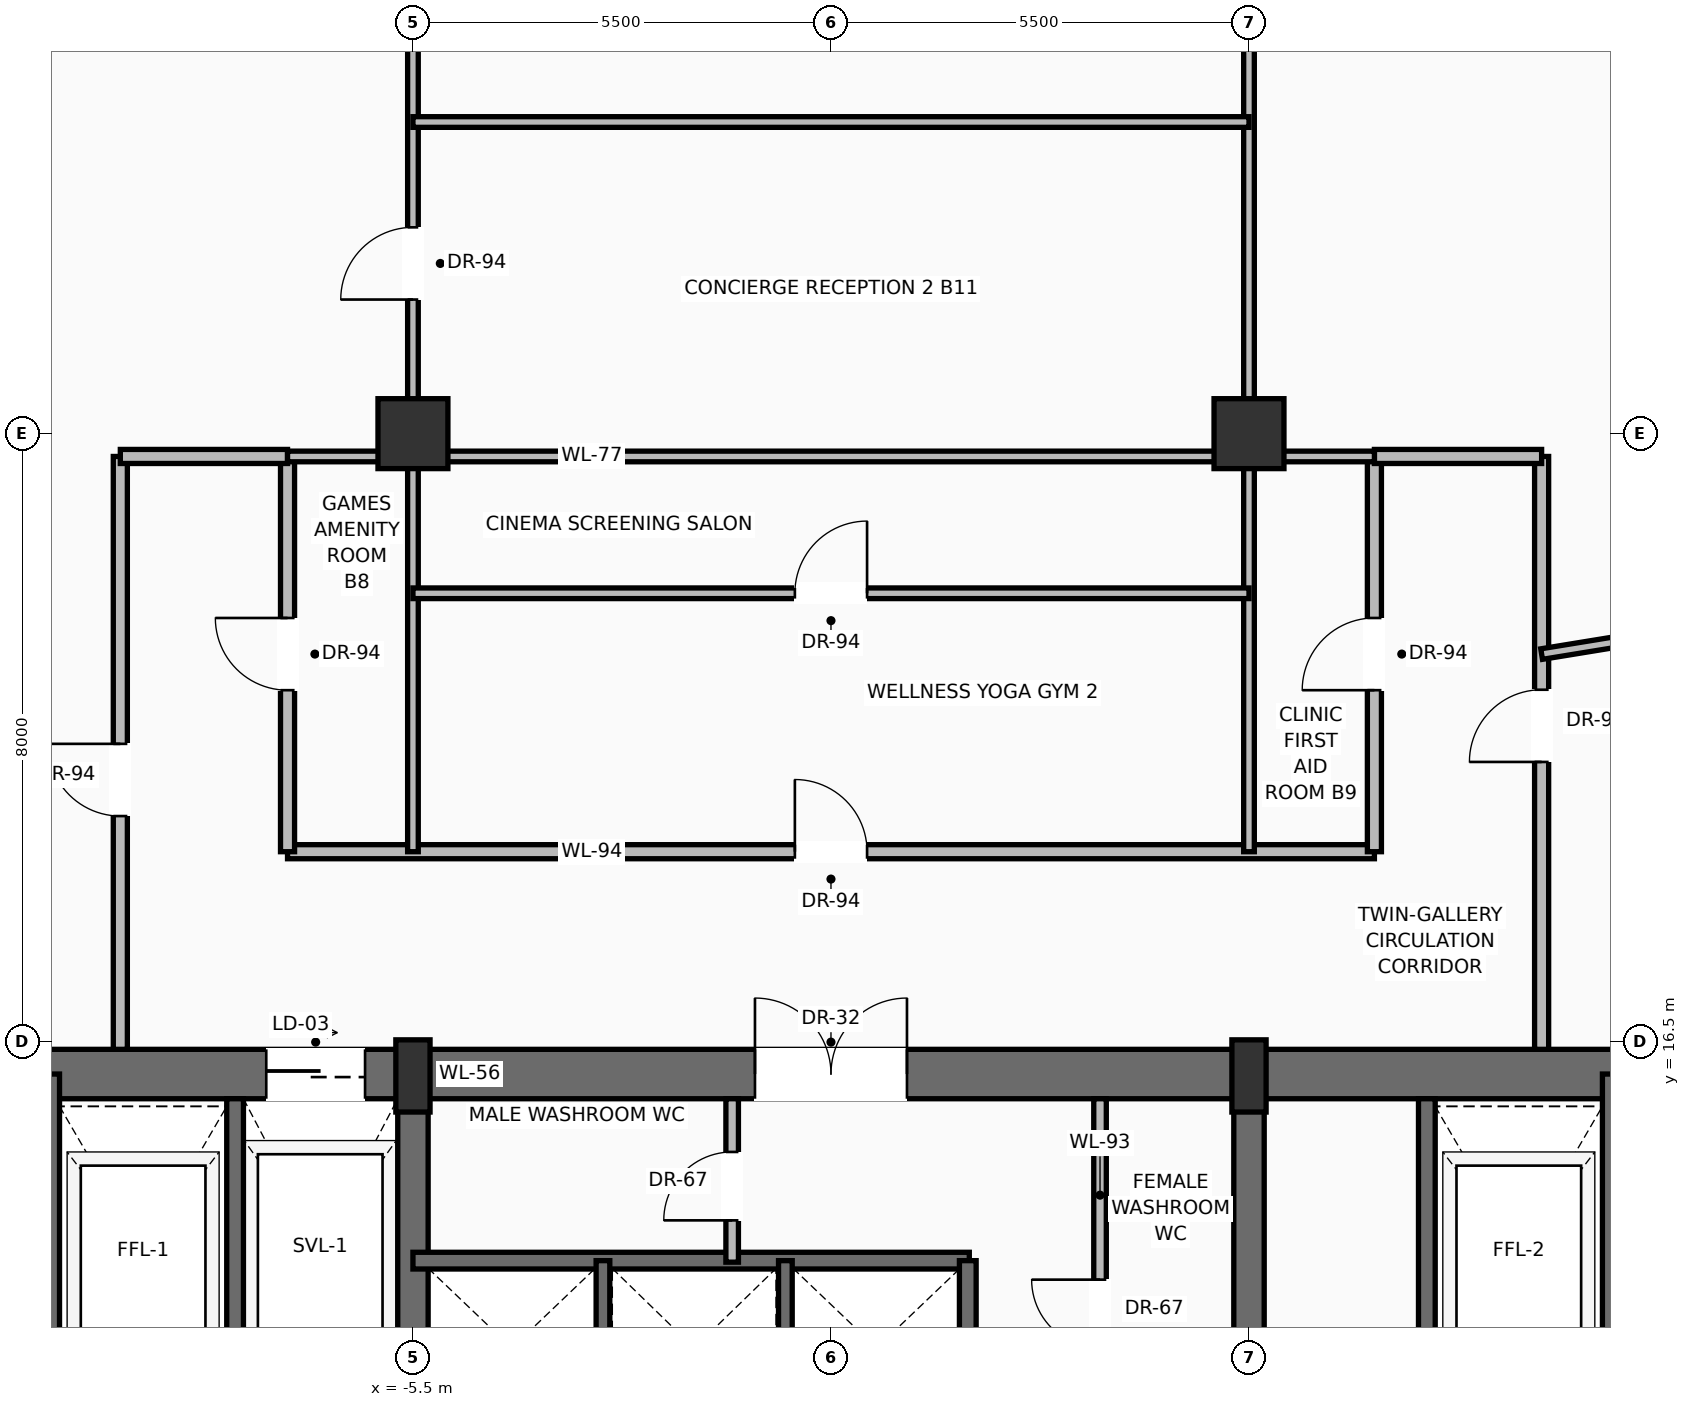
"""IFC4 building model, lengths in metres.
Left out: names, types, materials, properties, quantities, classifications, styles, units other than length and angle.
Written with IfcOpenShell. Run it as: python <this file> out.ifc"""

import sys

from ifc_helpers import new_model, si_unit, direction, frame, frame_2d, origin, origin_2d, place, context, subcontext, project, spatial, rectangle, extrude, source, transform, mapped, element, fill, save


model = new_model("IFC4")
c1 = context("Model", 3, precision=1e-05, world=origin(), true_north=direction((0.0, 1.0)))
c2 = subcontext(c1, "Body", "Model", "MODEL_VIEW")
j1 = project(units=[si_unit("LENGTHUNIT", "METRE"), si_unit("PLANEANGLEUNIT", "RADIAN")], contexts=[c1])
p1 = place(None, origin())
s1 = spatial("IfcSite", under=j1, at=p1, CompositionType="ELEMENT")
p2 = place(p1, origin())
s2 = spatial("IfcBuilding", under=s1, at=p2, CompositionType="ELEMENT")
p3 = place(p2, frame((0.0, 0.0, 171.0)))
s3 = spatial("IfcBuildingStorey", under=s2, at=p3, CompositionType="ELEMENT", Elevation=171.0)
p4 = place(p3, frame((-10.8, 16.075, 0.0), z_axis=(0.0, 0.0, 1.0), x_axis=(1.0, 0.0, 0.0)))
e1 = element("IfcWall", 1, at=p4, inside=s3, PredefinedType="SHEAR", context=c2, shape_type="SweptSolid", body=[
    extrude(rectangle(XDim=21.6, YDim=0.65, at=frame_2d((10.8, 0.0))), origin(), (0.0, 0.0, 1.0), 3.47),
])
p5 = place(p4, frame((3.37, 0.0, 0.0)))
e2 = element("IfcOpeningElement", 2, at=p5, cuts=e1, PredefinedType="OPENING", context=c2, shape_type="SweptSolid", body=[
    extrude(rectangle(XDim=1.3, YDim=2.3, at=frame_2d((0.65, 1.15))), frame((0.0, 0.335, 0.0), z_axis=(0.0, -1.0, 0.0), x_axis=(1.0, 0.0, 0.0)), (0.0, 0.0, 1.0), 0.67),
])
p6 = place(p4, frame((9.8, 0.0, 0.0)))
e3 = element("IfcOpeningElement", 3, at=p6, cuts=e1, PredefinedType="OPENING", context=c2, shape_type="SweptSolid", body=[
    extrude(rectangle(XDim=2.0, YDim=2.4, at=frame_2d((1.0, 1.2))), frame((0.0, 0.335, 0.0), z_axis=(0.0, -1.0, 0.0), x_axis=(1.0, 0.0, 0.0)), (0.0, 0.0, 1.0), 0.67),
])
for number, where, z_axis, x_axis in (
    (4, (-10.475, 0.525, 0.0), (0.0, 0.0, 1.0), (0.0, 1.0, 0.0)),
    (5, (10.475, 0.525, 0.0), (0.0, 0.0, 1.0), (0.0, 1.0, 0.0)),
):
    element("IfcWall", number, at=place(p3, frame(where, z_axis=z_axis, x_axis=x_axis)), inside=s3, PredefinedType="SHEAR", context=c2, shape_type="SweptSolid", body=[
        extrude(rectangle(XDim=15.55, YDim=0.65, at=frame_2d((7.775, 0.0))), origin(), (0.0, 0.0, 1.0), 3.47),
    ])
p7 = place(p3, frame((-5.5, 0.525, 0.0), z_axis=(0.0, 0.0, 1.0), x_axis=(0.0, 1.0, 0.0)))
e6 = element("IfcWall", 6, at=p7, inside=s3, PredefinedType="SHEAR", context=c2, shape_type="SweptSolid", body=[
    extrude(rectangle(XDim=15.55, YDim=0.4, at=frame_2d((7.775, 0.0))), origin(), (0.0, 0.0, 1.0), 3.47),
])
p8 = place(p7, frame((8.975, 0.0, 0.0)))
e7 = element("IfcOpeningElement", 7, at=p8, cuts=e6, PredefinedType="OPENING", context=c2, shape_type="SweptSolid", body=[
    extrude(rectangle(XDim=1.1, YDim=2.2, at=frame_2d((0.55, 1.1))), frame((0.0, 0.21, 0.0), z_axis=(0.0, -1.0, 0.0), x_axis=(1.0, 0.0, 0.0)), (0.0, 0.0, 1.0), 0.42),
])
p9 = place(p3, frame((5.5, 0.525, 0.0), z_axis=(0.0, 0.0, 1.0), x_axis=(0.0, 1.0, 0.0)))
e8 = element("IfcWall", 8, at=p9, inside=s3, PredefinedType="SHEAR", context=c2, shape_type="SweptSolid", body=[
    extrude(rectangle(XDim=15.55, YDim=0.4, at=frame_2d((7.775, 0.0))), origin(), (0.0, 0.0, 1.0), 3.47),
])
p10 = place(p9, frame((8.975, 0.0, 0.0)))
e9 = element("IfcOpeningElement", 9, at=p10, cuts=e8, PredefinedType="OPENING", context=c2, shape_type="SweptSolid", body=[
    extrude(rectangle(XDim=1.1, YDim=2.2, at=frame_2d((0.55, 1.1))), frame((0.0, 0.21, 0.0), z_axis=(0.0, -1.0, 0.0), x_axis=(1.0, 0.0, 0.0)), (0.0, 0.0, 1.0), 0.42),
])
m1 = source(origin(), c2, "Body", "SweptSolid", [
    extrude(rectangle(XDim=0.45, YDim=0.95, at=origin_2d()), origin(), (0.0, 0.0, 1.0), 3.7),
])
for number, where, z_axis, x_axis in (
    (10, (-5.5, 16.05, 0.0), (0.0, 0.0, 1.0), (1.0, 0.0, 0.0)),
    (11, (5.5, 16.05, 0.0), (0.0, 0.0, 1.0), (1.0, 0.0, 0.0)),
):
    element("IfcColumn", number, at=place(p3, frame(where, z_axis=z_axis, x_axis=x_axis)), inside=s3, PredefinedType="PILASTER", context=c2, shape_type="MappedRepresentation", body=[
        mapped(m1, transform((0.0, 0.0, 0.0), scale=1.0)),
    ])
m2 = source(origin(), c2, "Body", "SweptSolid", [
    extrude(rectangle(XDim=0.92, YDim=0.92, at=origin_2d()), origin(), (0.0, 0.0, 1.0), 3.7),
])
for number, where, z_axis, x_axis in (
    (12, (-5.5, 24.5, 0.0), (0.0, 0.0, 1.0), (1.0, 0.0, 0.0)),
    (13, (5.5, 24.5, 0.0), (0.0, 0.0, 1.0), (1.0, 0.0, 0.0)),
):
    element("IfcColumn", number, at=place(p3, frame(where, z_axis=z_axis, x_axis=x_axis)), inside=s3, PredefinedType="COLUMN", context=c2, shape_type="MappedRepresentation", body=[
        mapped(m2, transform((0.0, 0.0, 0.0), scale=1.0)),
    ])
for number, where, z_axis, x_axis in (
    (14, (-7.84, 11.87, 0.0), (0.0, 0.0, 1.0), (0.0, 1.0, 0.0)),
    (15, (7.84, 11.87, 0.0), (0.0, 0.0, 1.0), (0.0, 1.0, 0.0)),
):
    element("IfcWall", number, at=place(p3, frame(where, z_axis=z_axis, x_axis=x_axis)), inside=s3, PredefinedType="SOLIDWALL", context=c2, shape_type="SweptSolid", body=[
        extrude(rectangle(XDim=3.88, YDim=0.22, at=frame_2d((1.94, 0.0))), origin(), (0.0, 0.0, 1.0), 3.47),
    ])
p11 = place(p3, frame((-5.5, 13.62, 0.0), z_axis=(0.0, 0.0, 1.0), x_axis=(1.0, 0.0, 0.0)))
e16 = element("IfcWall", 16, at=p11, inside=s3, PredefinedType="SOLIDWALL", context=c2, shape_type="SweptSolid", body=[
    extrude(rectangle(XDim=7.32, YDim=0.22, at=frame_2d((3.66, 0.0))), origin(), (0.0, 0.0, 1.0), 3.47),
])
p12 = place(p3, frame((1.8, 11.32, 0.0), z_axis=(0.0, 0.0, 1.0), x_axis=(0.0, 1.0, 0.0)))
e17 = element("IfcWall", 17, at=p12, inside=s3, PredefinedType="SOLIDWALL", context=c2, shape_type="SweptSolid", body=[
    extrude(rectangle(XDim=2.3, YDim=0.22, at=frame_2d((1.15, 0.0))), origin(), (0.0, 0.0, 1.0), 3.47),
])
for number, where, z_axis, x_axis in (
    (18, (-3.0, 11.32, 0.0), (0.0, 0.0, 1.0), (0.0, 1.0, 0.0)),
    (19, (-0.6, 11.32, 0.0), (0.0, 0.0, 1.0), (0.0, 1.0, 0.0)),
):
    element("IfcWall", number, at=place(p3, frame(where, z_axis=z_axis, x_axis=x_axis)), inside=s3, PredefinedType="SOLIDWALL", context=c2, shape_type="SweptSolid", body=[
        extrude(rectangle(XDim=2.3, YDim=0.18, at=frame_2d((1.15, 0.0))), origin(), (0.0, 0.0, 1.0), 3.47),
    ])
p13 = place(p3, frame((-1.3, 13.6, 0.0), z_axis=(0.0, 0.0, 1.0), x_axis=(0.0, 1.0, 0.0)))
e20 = element("IfcWall", 20, at=p13, inside=s3, PredefinedType="PARTITIONING", context=c2, shape_type="SweptSolid", body=[
    extrude(rectangle(XDim=2.15, YDim=0.165, at=frame_2d((1.075, 0.0))), origin(), (0.0, 0.0, 1.0), 3.462),
])
p14 = place(p13, frame((0.55, 0.0, 0.0)))
e21 = element("IfcOpeningElement", 21, at=p14, cuts=e20, PredefinedType="OPENING", context=c2, shape_type="SweptSolid", body=[
    extrude(rectangle(XDim=0.9, YDim=2.1, at=frame_2d((0.45, 1.05))), frame((0.0, 0.093, 0.0), z_axis=(0.0, -1.0, 0.0), x_axis=(1.0, 0.0, 0.0)), (0.0, 0.0, 1.0), 0.185),
])
p15 = place(p3, frame((3.54, 11.22, 0.0), z_axis=(0.0, 0.0, 1.0), x_axis=(0.0, 1.0, 0.0)))
e22 = element("IfcWall", 22, at=p15, inside=s3, PredefinedType="PARTITIONING", context=c2, shape_type="SweptSolid", body=[
    extrude(rectangle(XDim=4.53, YDim=0.165, at=frame_2d((2.265, 0.0))), origin(), (0.0, 0.0, 1.0), 3.462),
])
p16 = place(p15, frame((1.25, 0.0, 0.0)))
e23 = element("IfcOpeningElement", 23, at=p16, cuts=e22, PredefinedType="OPENING", context=c2, shape_type="SweptSolid", body=[
    extrude(rectangle(XDim=0.9, YDim=2.1, at=frame_2d((0.45, 1.05))), frame((0.0, 0.093, 0.0), z_axis=(0.0, -1.0, 0.0), x_axis=(1.0, 0.0, 0.0)), (0.0, 0.0, 1.0), 0.185),
])
p17 = place(p3, frame((-7.15, 19.0, 0.0), z_axis=(0.0, 0.0, 1.0), x_axis=(1.0, 0.0, 0.0)))
e24 = element("IfcWall", 24, at=p17, inside=s3, PredefinedType="PARTITIONING", context=c2, shape_type="SweptSolid", body=[
    extrude(rectangle(XDim=14.3, YDim=0.185, at=frame_2d((7.15, 0.0))), origin(), (0.0, 0.0, 1.0), 2.846),
])
p18 = place(p17, frame((6.675, 0.0, 0.0)))
e25 = element("IfcOpeningElement", 25, at=p18, cuts=e24, PredefinedType="OPENING", context=c2, shape_type="SweptSolid", body=[
    extrude(rectangle(XDim=0.95, YDim=2.2, at=frame_2d((0.475, 1.1))), frame((0.0, 0.103, 0.0), z_axis=(0.0, -1.0, 0.0), x_axis=(1.0, 0.0, 0.0)), (0.0, 0.0, 1.0), 0.205),
])
p19 = place(p3, frame((-7.15, 19.0, 0.0), z_axis=(0.0, 0.0, 1.0), x_axis=(0.0, 1.0, 0.0)))
e26 = element("IfcWall", 26, at=p19, inside=s3, PredefinedType="PARTITIONING", context=c2, shape_type="SweptSolid", body=[
    extrude(rectangle(XDim=5.2, YDim=0.185, at=frame_2d((2.6, 0.0))), origin(), (0.0, 0.0, 1.0), 3.462),
])
p20 = place(p19, frame((2.125, 0.0, 0.0)))
e27 = element("IfcOpeningElement", 27, at=p20, cuts=e26, PredefinedType="OPENING", context=c2, shape_type="SweptSolid", body=[
    extrude(rectangle(XDim=0.95, YDim=2.2, at=frame_2d((0.475, 1.1))), frame((0.0, 0.103, 0.0), z_axis=(0.0, -1.0, 0.0), x_axis=(1.0, 0.0, 0.0)), (0.0, 0.0, 1.0), 0.205),
])
p21 = place(p3, frame((7.15, 19.0, 0.0), z_axis=(0.0, 0.0, 1.0), x_axis=(0.0, 1.0, 0.0)))
e28 = element("IfcWall", 28, at=p21, inside=s3, PredefinedType="PARTITIONING", context=c2, shape_type="SweptSolid", body=[
    extrude(rectangle(XDim=5.2, YDim=0.185, at=frame_2d((2.6, 0.0))), origin(), (0.0, 0.0, 1.0), 3.462),
])
p22 = place(p21, frame((2.125, 0.0, 0.0)))
e29 = element("IfcOpeningElement", 29, at=p22, cuts=e28, PredefinedType="OPENING", context=c2, shape_type="SweptSolid", body=[
    extrude(rectangle(XDim=0.95, YDim=2.2, at=frame_2d((0.475, 1.1))), frame((0.0, 0.103, 0.0), z_axis=(0.0, -1.0, 0.0), x_axis=(1.0, 0.0, 0.0)), (0.0, 0.0, 1.0), 0.205),
])
p23 = place(p3, frame((-9.35, 16.4, 0.0), z_axis=(0.0, 0.0, 1.0), x_axis=(0.0, 1.0, 0.0)))
e30 = element("IfcWall", 30, at=p23, inside=s3, PredefinedType="PARTITIONING", context=c2, shape_type="SweptSolid", body=[
    extrude(rectangle(XDim=7.8, YDim=0.185, at=frame_2d((3.9, 0.0))), origin(), (0.0, 0.0, 1.0), 3.462),
])
p24 = place(p23, frame((3.069, 0.0, 0.0)))
e31 = element("IfcOpeningElement", 31, at=p24, cuts=e30, PredefinedType="OPENING", context=c2, shape_type="SweptSolid", body=[
    extrude(rectangle(XDim=0.95, YDim=2.2, at=frame_2d((0.475, 1.1))), frame((0.0, 0.103, 0.0), z_axis=(0.0, -1.0, 0.0), x_axis=(1.0, 0.0, 0.0)), (0.0, 0.0, 1.0), 0.205),
])
p25 = place(p3, frame((9.35, 16.4, 0.0), z_axis=(0.0, 0.0, 1.0), x_axis=(0.0, 1.0, 0.0)))
e32 = element("IfcWall", 32, at=p25, inside=s3, PredefinedType="PARTITIONING", context=c2, shape_type="SweptSolid", body=[
    extrude(rectangle(XDim=7.8, YDim=0.185, at=frame_2d((3.9, 0.0))), origin(), (0.0, 0.0, 1.0), 3.462),
])
p26 = place(p25, frame((3.781, 0.0, 0.0)))
e33 = element("IfcOpeningElement", 33, at=p26, cuts=e32, PredefinedType="OPENING", context=c2, shape_type="SweptSolid", body=[
    extrude(rectangle(XDim=0.95, YDim=2.2, at=frame_2d((0.475, 1.1))), frame((0.0, 0.103, 0.0), z_axis=(0.0, -1.0, 0.0), x_axis=(1.0, 0.0, 0.0)), (0.0, 0.0, 1.0), 0.205),
])
for number, where, z_axis, x_axis in (
    (34, (-9.35, 24.2, 0.0), (0.0, 0.0, 1.0), (1.0, 0.0, 0.0)),
    (35, (7.15, 24.2, 0.0), (0.0, 0.0, 1.0), (1.0, 0.0, 0.0)),
):
    element("IfcWall", number, at=place(p3, frame(where, z_axis=z_axis, x_axis=x_axis)), inside=s3, PredefinedType="PARTITIONING", context=c2, shape_type="SweptSolid", body=[
        extrude(rectangle(XDim=2.2, YDim=0.185, at=frame_2d((1.1, 0.0))), origin(), (0.0, 0.0, 1.0), 3.462),
    ])
p27 = place(p3, frame((-7.15, 24.2, 0.0), z_axis=(0.0, 0.0, 1.0), x_axis=(1.0, 0.0, 0.0)))
e36 = element("IfcWall", 36, at=p27, inside=s3, PredefinedType="PARTITIONING", context=c2, shape_type="SweptSolid", body=[
    extrude(rectangle(XDim=14.3, YDim=0.14, at=frame_2d((7.15, 0.0))), origin(), (0.0, 0.0, 1.0), 3.462),
])
p28 = place(p3, frame((-5.5, 19.0, 0.0), z_axis=(0.0, 0.0, 1.0), x_axis=(0.0, 1.0, 0.0)))
e37 = element("IfcWall", 37, at=p28, inside=s3, PredefinedType="PARTITIONING", context=c2, shape_type="SweptSolid", body=[
    extrude(rectangle(XDim=13.5, YDim=0.14, at=frame_2d((6.75, 0.0))), origin(), (0.0, 0.0, 1.0), 2.846),
])
p29 = place(p28, frame((7.264, 0.0, 0.0)))
e38 = element("IfcOpeningElement", 38, at=p29, cuts=e37, PredefinedType="OPENING", context=c2, shape_type="SweptSolid", body=[
    extrude(rectangle(XDim=0.95, YDim=2.2, at=frame_2d((0.475, 1.1))), frame((0.0, 0.08, 0.0), z_axis=(0.0, -1.0, 0.0), x_axis=(1.0, 0.0, 0.0)), (0.0, 0.0, 1.0), 0.16),
])
p30 = place(p3, frame((5.5, 19.0, 0.0), z_axis=(0.0, 0.0, 1.0), x_axis=(0.0, 1.0, 0.0)))
e39 = element("IfcWall", 39, at=p30, inside=s3, PredefinedType="PARTITIONING", context=c2, shape_type="SweptSolid", body=[
    extrude(rectangle(XDim=13.5, YDim=0.14, at=frame_2d((6.75, 0.0))), origin(), (0.0, 0.0, 1.0), 2.846),
])
p31 = place(p3, frame((-5.5, 22.4, 0.0), z_axis=(0.0, 0.0, 1.0), x_axis=(1.0, 0.0, 0.0)))
e40 = element("IfcWall", 40, at=p31, inside=s3, PredefinedType="PARTITIONING", context=c2, shape_type="SweptSolid", body=[
    extrude(rectangle(XDim=11.0, YDim=0.14, at=frame_2d((5.5, 0.0))), origin(), (0.0, 0.0, 1.0), 3.462),
])
p32 = place(p31, frame((5.025, 0.0, 0.0)))
e41 = element("IfcOpeningElement", 41, at=p32, cuts=e40, PredefinedType="OPENING", context=c2, shape_type="SweptSolid", body=[
    extrude(rectangle(XDim=0.95, YDim=2.2, at=frame_2d((0.475, 1.1))), frame((0.0, 0.08, 0.0), z_axis=(0.0, -1.0, 0.0), x_axis=(1.0, 0.0, 0.0)), (0.0, 0.0, 1.0), 0.16),
])
p33 = place(p3, frame((-5.5, 28.6, 0.0), z_axis=(0.0, 0.0, 1.0), x_axis=(1.0, 0.0, 0.0)))
e42 = element("IfcWall", 42, at=p33, inside=s3, PredefinedType="PARTITIONING", context=c2, shape_type="SweptSolid", body=[
    extrude(rectangle(XDim=11.0, YDim=0.14, at=frame_2d((5.5, 0.0))), origin(), (0.0, 0.0, 1.0), 3.462),
])
p34 = place(p3, frame((9.35, 21.6, 0.0), z_axis=(0.0, 0.0, 1.0), x_axis=(0.986959646551, 0.160967872817, 0.0)))
e43 = element("IfcWall", 43, at=p34, inside=s3, PredefinedType="PARTITIONING", context=c2, shape_type="SweptSolid", body=[
    extrude(rectangle(XDim=7.456, YDim=0.14, at=frame_2d((3.728, 0.0))), origin(), (0.0, 0.0, 1.0), 3.049),
])
m3 = source(origin(), c2, "Body", "SweptSolid", [
    extrude(rectangle(XDim=1.3, YDim=2.3, at=frame_2d((0.65, 1.15))), frame((0.0, 0.025, 0.0), z_axis=(0.0, -1.0, 0.0), x_axis=(1.0, 0.0, 0.0)), (0.0, 0.0, 1.0), 0.05),
])
p35 = place(p5, origin())
e44 = element("IfcDoor", 44, at=p35, inside=s3, OperationType="SLIDING_TO_RIGHT", PredefinedType="DOOR", context=c2, shape_type="MappedRepresentation", body=[
    mapped(m3, transform((0.0, 0.0, 0.0), scale=1.0)),
])
fill(e2, e44)
m4 = source(origin(), c2, "Body", "SweptSolid", [
    extrude(rectangle(XDim=2.0, YDim=2.4, at=frame_2d((1.0, 1.2))), frame((0.0, 0.025, 0.0), z_axis=(0.0, -1.0, 0.0), x_axis=(1.0, 0.0, 0.0)), (0.0, 0.0, 1.0), 0.05),
])
p36 = place(p6, origin())
e45 = element("IfcDoor", 45, at=p36, inside=s3, OperationType="DOUBLE_DOOR_SINGLE_SWING", PredefinedType="DOOR", context=c2, shape_type="MappedRepresentation", body=[
    mapped(m4, transform((0.0, 0.0, 0.0), scale=1.0)),
])
fill(e3, e45)
m5 = source(origin(), c2, "Body", "SweptSolid", [
    extrude(rectangle(XDim=0.9, YDim=2.1, at=frame_2d((0.45, 1.05))), frame((0.0, 0.025, 0.0), z_axis=(0.0, -1.0, 0.0), x_axis=(1.0, 0.0, 0.0)), (0.0, 0.0, 1.0), 0.05),
])
p37 = place(p14, origin())
e46 = element("IfcDoor", 46, at=p37, inside=s3, OperationType="SINGLE_SWING_LEFT", PredefinedType="DOOR", context=c2, shape_type="MappedRepresentation", body=[
    mapped(m5, transform((0.0, 0.0, 0.0), scale=1.0)),
])
fill(e21, e46)
p38 = place(p16, origin())
e47 = element("IfcDoor", 47, at=p38, inside=s3, OperationType="SINGLE_SWING_RIGHT", PredefinedType="DOOR", context=c2, shape_type="MappedRepresentation", body=[
    mapped(m5, transform((0.0, 0.0, 0.0), scale=1.0)),
])
fill(e23, e47)
m6 = source(origin(), c2, "Body", "SweptSolid", [
    extrude(rectangle(XDim=0.95, YDim=2.2, at=frame_2d((0.475, 1.1))), frame((0.0, 0.025, 0.0), z_axis=(0.0, -1.0, 0.0), x_axis=(1.0, 0.0, 0.0)), (0.0, 0.0, 1.0), 0.05),
])
p39 = place(p18, origin())
e48 = element("IfcDoor", 48, at=p39, inside=s3, OperationType="SINGLE_SWING_LEFT", PredefinedType="DOOR", context=c2, shape_type="MappedRepresentation", body=[
    mapped(m6, transform((0.0, 0.0, 0.0), scale=1.0)),
])
fill(e25, e48)
p40 = place(p24, origin())
e49 = element("IfcDoor", 49, at=p40, inside=s3, OperationType="SINGLE_SWING_RIGHT", PredefinedType="DOOR", context=c2, shape_type="MappedRepresentation", body=[
    mapped(m6, transform((0.0, 0.0, 0.0), scale=1.0)),
])
fill(e31, e49)
p41 = place(p26, origin())
e50 = element("IfcDoor", 50, at=p41, inside=s3, OperationType="SINGLE_SWING_LEFT", PredefinedType="DOOR", context=c2, shape_type="MappedRepresentation", body=[
    mapped(m6, transform((0.0, 0.0, 0.0), scale=1.0)),
])
fill(e33, e50)
p42 = place(p20, origin())
e51 = element("IfcDoor", 51, at=p42, inside=s3, OperationType="SINGLE_SWING_RIGHT", PredefinedType="DOOR", context=c2, shape_type="MappedRepresentation", body=[
    mapped(m6, transform((0.0, 0.0, 0.0), scale=1.0)),
])
fill(e27, e51)
p43 = place(p22, origin())
e52 = element("IfcDoor", 52, at=p43, inside=s3, OperationType="SINGLE_SWING_LEFT", PredefinedType="DOOR", context=c2, shape_type="MappedRepresentation", body=[
    mapped(m6, transform((0.0, 0.0, 0.0), scale=1.0)),
])
fill(e29, e52)
p44 = place(p32, origin())
e53 = element("IfcDoor", 53, at=p44, inside=s3, OperationType="SINGLE_SWING_RIGHT", PredefinedType="DOOR", context=c2, shape_type="MappedRepresentation", body=[
    mapped(m6, transform((0.0, 0.0, 0.0), scale=1.0)),
])
fill(e41, e53)
p45 = place(p29, origin())
e54 = element("IfcDoor", 54, at=p45, inside=s3, OperationType="SINGLE_SWING_LEFT", PredefinedType="DOOR", context=c2, shape_type="MappedRepresentation", body=[
    mapped(m6, transform((0.0, 0.0, 0.0), scale=1.0)),
])
fill(e38, e54)
save(model, sys.argv[1])
